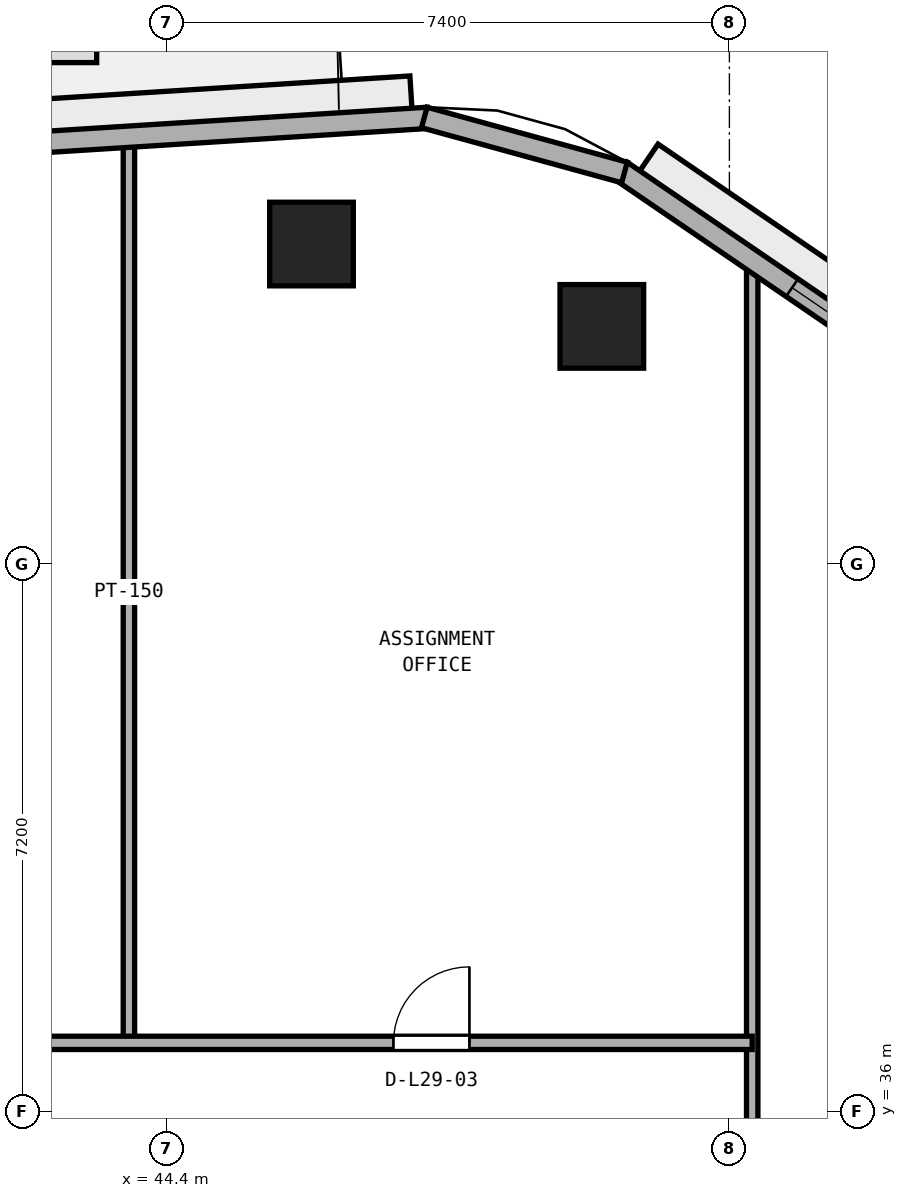
"""IFC4 building model, lengths in metres.
Left out: names, types, materials, properties, quantities, classifications, styles, units other than length and angle.
Written with IfcOpenShell. Run it as: python <this file> out.ifc"""

import sys

from ifc_helpers import new_model, si_unit, direction, frame, frame_2d, origin, origin_2d, place, context, subcontext, project, spatial, rectangle, extrude, element, fill, save


model = new_model("IFC4")
c1 = context("Model", 3, precision=1e-05, world=origin(), true_north=direction((0.0, 1.0)))
c2 = subcontext(c1, "Body", "Model", "MODEL_VIEW")
j1 = project(units=[si_unit("LENGTHUNIT", "METRE"), si_unit("PLANEANGLEUNIT", "RADIAN")], contexts=[c1])
p1 = place(None, origin())
s1 = spatial("IfcSite", under=j1, at=p1, CompositionType="ELEMENT")
p2 = place(p1, origin())
s2 = spatial("IfcBuilding", under=s1, at=p2, CompositionType="ELEMENT")
p3 = place(p2, frame((0.0, 0.0, 116.2)))
s3 = spatial("IfcBuildingStorey", under=s2, at=p3, CompositionType="ELEMENT", Elevation=116.2)
for number, where, z_axis, x_axis in (
    (1, (50.122, 46.326, 0.0), (0.0, 0.0, 1.0), (1.0, 0.0, 0.0)),
    (2, (46.302, 47.409, 0.0), (0.0, 0.0, 1.0), (1.0, 0.0, 0.0)),
):
    element("IfcColumn", number, at=place(p3, frame(where, z_axis=z_axis, x_axis=x_axis)), inside=s3, PredefinedType="COLUMN", context=c2, shape_type="SweptSolid", body=[
        extrude(rectangle(XDim=1.1, YDim=1.1, at=origin_2d()), origin(), (0.0, 0.0, 1.0), 3.8),
    ])
p4 = place(p3, frame((52.1, 13.5, 0.0), z_axis=(0.0, 0.0, 1.0), x_axis=(0.0, 1.0, 0.0)))
e3 = element("IfcWall", 3, at=p4, inside=s3, PredefinedType="PARTITIONING", context=c2, shape_type="SweptSolid", body=[
    extrude(rectangle(XDim=33.723, YDim=0.15, at=frame_2d((16.861, 0.0))), origin(), (0.0, 0.0, 1.0), 3.4),
])
p5 = place(p4, frame((4.475, 0.0, 0.0)))
e4 = element("IfcOpeningElement", 4, at=p5, cuts=e3, PredefinedType="OPENING", context=c2, shape_type="SweptSolid", body=[
    extrude(rectangle(XDim=0.9, YDim=2.1, at=frame_2d((0.45, 1.05))), frame((0.0, 0.085, 0.0), z_axis=(0.0, -1.0, 0.0), x_axis=(1.0, 0.0, 0.0)), (0.0, 0.0, 1.0), 0.17),
])
p6 = place(p4, frame((9.85, 0.0, 0.0)))
e5 = element("IfcOpeningElement", 5, at=p6, cuts=e3, PredefinedType="OPENING", context=c2, shape_type="SweptSolid", body=[
    extrude(rectangle(XDim=0.9, YDim=2.1, at=frame_2d((0.45, 1.05))), frame((0.0, 0.085, 0.0), z_axis=(0.0, -1.0, 0.0), x_axis=(1.0, 0.0, 0.0)), (0.0, 0.0, 1.0), 0.17),
])
p7 = place(p4, frame((18.4, 0.0, 0.0)))
e6 = element("IfcOpeningElement", 6, at=p7, cuts=e3, PredefinedType="OPENING", context=c2, shape_type="SweptSolid", body=[
    extrude(rectangle(XDim=0.9, YDim=2.1, at=frame_2d((0.45, 1.05))), frame((0.0, 0.085, 0.0), z_axis=(0.0, -1.0, 0.0), x_axis=(1.0, 0.0, 0.0)), (0.0, 0.0, 1.0), 0.17),
])
p8 = place(p3, frame((43.9, 36.9, 0.0), z_axis=(0.0, 0.0, 1.0), x_axis=(0.0, 1.0, 0.0)))
e7 = element("IfcWall", 7, at=p8, inside=s3, PredefinedType="PARTITIONING", context=c2, shape_type="SweptSolid", body=[
    extrude(rectangle(XDim=11.857, YDim=0.15, at=frame_2d((5.928, 0.0))), origin(), (0.0, 0.0, 1.0), 3.4),
])
p9 = place(p3, frame((21.9, 36.9, 0.0), z_axis=(0.0, 0.0, 1.0), x_axis=(1.0, 0.0, 0.0)))
e8 = element("IfcWall", 8, at=p9, inside=s3, PredefinedType="PARTITIONING", context=c2, shape_type="SweptSolid", body=[
    extrude(rectangle(XDim=30.2, YDim=0.175, at=frame_2d((15.1, 0.0))), origin(), (0.0, 0.0, 1.0), 3.4),
])
p10 = place(p9, frame((4.87, 0.0, 0.0)))
e9 = element("IfcOpeningElement", 9, at=p10, cuts=e8, PredefinedType="OPENING", context=c2, shape_type="SweptSolid", body=[
    extrude(rectangle(XDim=1.0, YDim=2.12, at=frame_2d((0.5, 1.06))), frame((0.0, 0.097, 0.0), z_axis=(0.0, -1.0, 0.0), x_axis=(1.0, 0.0, 0.0)), (0.0, 0.0, 1.0), 0.195),
])
p11 = place(p9, frame((15.75, 0.0, 0.0)))
e10 = element("IfcOpeningElement", 10, at=p11, cuts=e8, PredefinedType="OPENING", context=c2, shape_type="SweptSolid", body=[
    extrude(rectangle(XDim=1.0, YDim=2.12, at=frame_2d((0.5, 1.06))), frame((0.0, 0.097, 0.0), z_axis=(0.0, -1.0, 0.0), x_axis=(1.0, 0.0, 0.0)), (0.0, 0.0, 1.0), 0.195),
])
p12 = place(p9, frame((25.48, 0.0, 0.0)))
e11 = element("IfcOpeningElement", 11, at=p12, cuts=e8, PredefinedType="OPENING", context=c2, shape_type="SweptSolid", body=[
    extrude(rectangle(XDim=1.0, YDim=2.12, at=frame_2d((0.5, 1.06))), frame((0.0, 0.097, 0.0), z_axis=(0.0, -1.0, 0.0), x_axis=(1.0, 0.0, 0.0)), (0.0, 0.0, 1.0), 0.195),
])
p13 = place(p3, frame((64.29, 38.867, 0.0), z_axis=(0.0, 0.0, 1.0), x_axis=(-0.825755550159, 0.564028165416, 0.0)))
e12 = element("IfcWall", 12, at=p13, inside=s3, PredefinedType="STANDARD", context=c2, shape_type="SweptSolid", body=[
    extrude(rectangle(XDim=16.848, YDim=0.28, at=frame_2d((8.424, 0.0))), origin(), (0.0, 0.0, 1.0), 3.4),
])
p14 = place(p13, frame((1.941, 0.0, 0.9)))
e13 = element("IfcOpeningElement", 13, at=p14, cuts=e12, PredefinedType="OPENING", context=c2, shape_type="SweptSolid", body=[
    extrude(rectangle(XDim=2.4, YDim=1.75, at=frame_2d((1.2, 0.875))), frame((0.0, 0.15, 0.0), z_axis=(0.0, -1.0, 0.0), x_axis=(1.0, 0.0, 0.0)), (0.0, 0.0, 1.0), 0.3),
])
p15 = place(p13, frame((7.224, 0.0, 0.9)))
e14 = element("IfcOpeningElement", 14, at=p15, cuts=e12, PredefinedType="OPENING", context=c2, shape_type="SweptSolid", body=[
    extrude(rectangle(XDim=2.4, YDim=1.75, at=frame_2d((1.2, 0.875))), frame((0.0, 0.15, 0.0), z_axis=(0.0, -1.0, 0.0), x_axis=(1.0, 0.0, 0.0)), (0.0, 0.0, 1.0), 0.3),
])
p16 = place(p13, frame((11.727, 0.0, 0.9)))
e15 = element("IfcOpeningElement", 15, at=p16, cuts=e12, PredefinedType="OPENING", context=c2, shape_type="SweptSolid", body=[
    extrude(rectangle(XDim=2.4, YDim=1.75, at=frame_2d((1.2, 0.875))), frame((0.0, 0.15, 0.0), z_axis=(0.0, -1.0, 0.0), x_axis=(1.0, 0.0, 0.0)), (0.0, 0.0, 1.0), 0.3),
])
p17 = place(p3, frame((47.832, 49.069, 0.0), z_axis=(0.0, 0.0, 1.0), x_axis=(-0.998017725054, -0.062933460723, 0.0)))
e16 = element("IfcWall", 16, at=p17, inside=s3, PredefinedType="STANDARD", context=c2, shape_type="SweptSolid", body=[
    extrude(rectangle(XDim=19.629, YDim=0.28, at=frame_2d((9.815, 0.0))), origin(), (0.0, 0.0, 1.0), 3.4),
])
p18 = place(p17, frame((9.265, 0.0, 0.0)))
e17 = element("IfcOpeningElement", 17, at=p18, cuts=e16, PredefinedType="OPENING", context=c2, shape_type="SweptSolid", body=[
    extrude(rectangle(XDim=1.1, YDim=2.2, at=frame_2d((0.55, 1.1))), frame((0.0, 0.15, 0.0), z_axis=(0.0, -1.0, 0.0), x_axis=(1.0, 0.0, 0.0)), (0.0, 0.0, 1.0), 0.3),
])
p19 = place(p3, frame((50.419, 48.351, 0.0), z_axis=(0.0, 0.0, 1.0), x_axis=(-0.964254516967, 0.264977784933, 0.0)))
e18 = element("IfcWall", 18, at=p19, inside=s3, PredefinedType="STANDARD", context=c2, shape_type="SweptSolid", body=[
    extrude(rectangle(XDim=2.731, YDim=0.28, at=frame_2d((1.365, 0.0))), origin(), (0.0, 0.0, 1.0), 3.4),
])
p20 = place(p12, origin())
e19 = element("IfcDoor", 19, at=p20, inside=s3, OperationType="SINGLE_SWING_RIGHT", PredefinedType="DOOR", context=c2, shape_type="SweptSolid", body=[
    extrude(rectangle(XDim=1.0, YDim=2.12, at=frame_2d((0.5, 1.06))), frame((0.0, 0.025, 0.0), z_axis=(0.0, -1.0, 0.0), x_axis=(1.0, 0.0, 0.0)), (0.0, 0.0, 1.0), 0.05),
])
fill(e11, e19)
p21 = place(p16, origin())
e20 = element("IfcWindow", 20, at=p21, inside=s3, PartitioningType="SINGLE_PANEL", PredefinedType="WINDOW", context=c2, shape_type="SweptSolid", body=[
    extrude(rectangle(XDim=2.4, YDim=1.75, at=frame_2d((1.2, 0.875))), frame((0.0, 0.03, 0.0), z_axis=(0.0, -1.0, 0.0), x_axis=(1.0, 0.0, 0.0)), (0.0, 0.0, 1.0), 0.06),
])
fill(e15, e20)
save(model, sys.argv[1])
